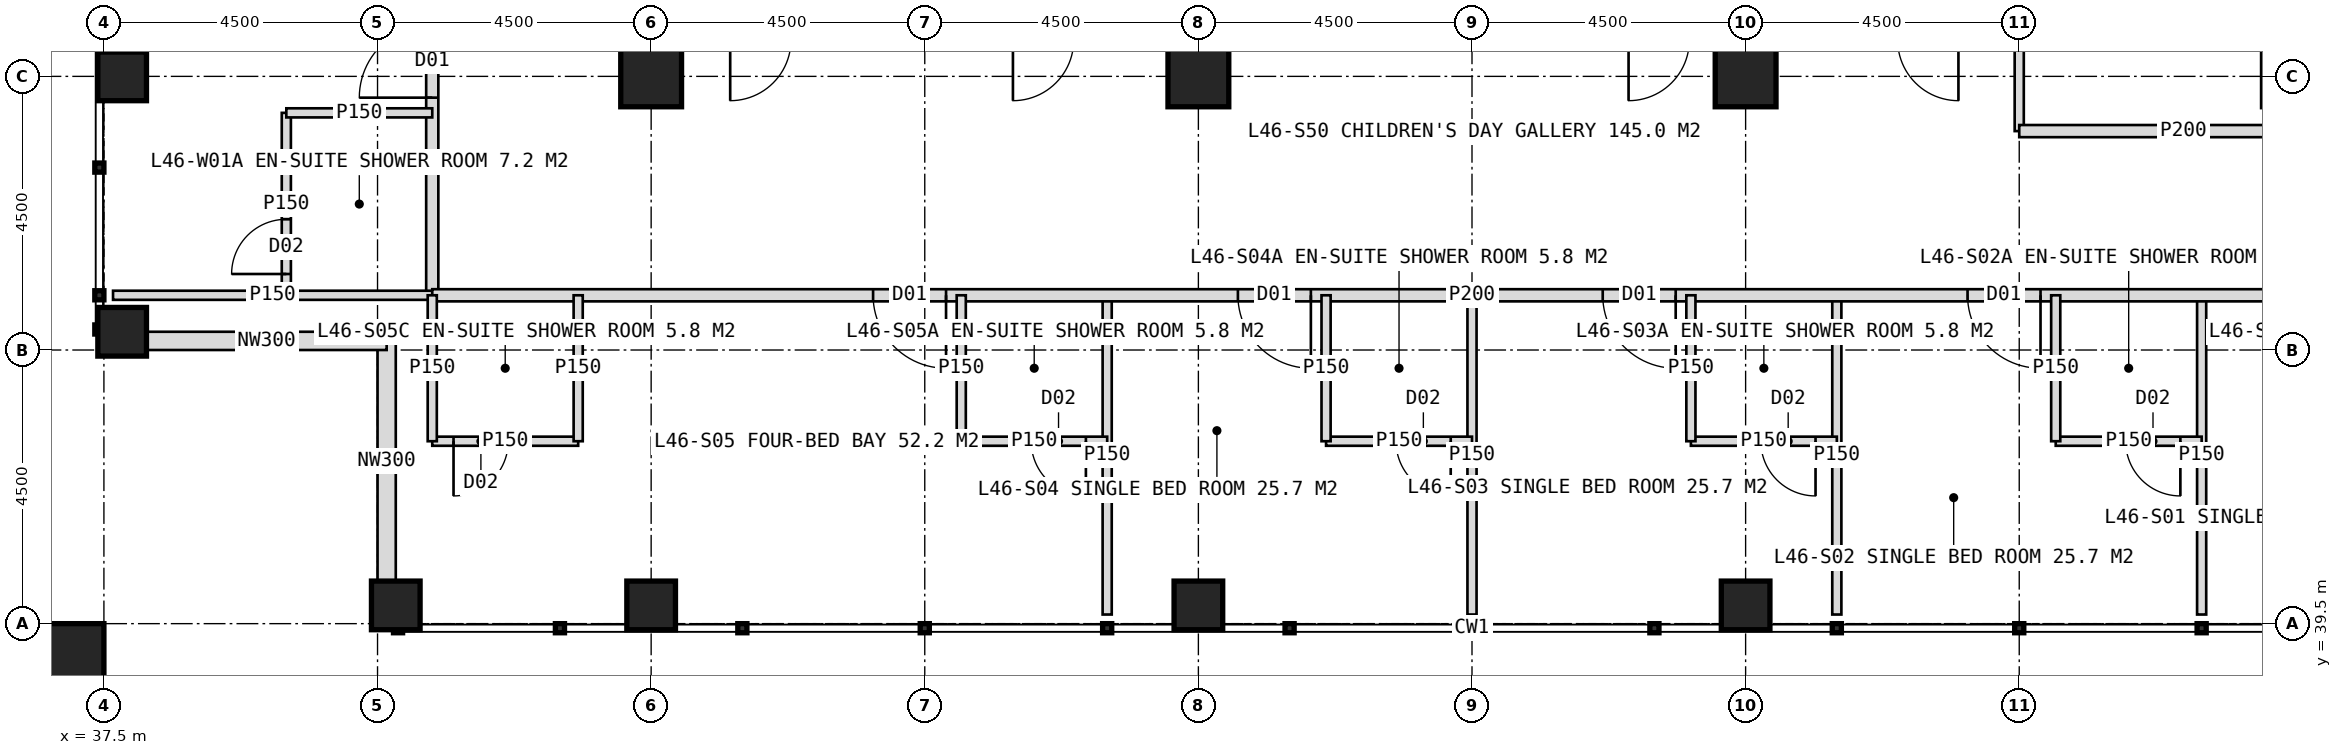
"""IFC4 building model, lengths in metres.
Left out: names, types, materials, properties, quantities, classifications, styles, units other than length and angle.
Written with IfcOpenShell. Run it as: python <this file> out.ifc"""

import sys

from ifc_helpers import new_model, si_unit, direction, frame, frame_2d, origin, origin_2d, place, context, subcontext, project, spatial, rectangle, hollow_rectangle, extrude, element, fill, save


model = new_model("IFC4")
c1 = context("Model", 3, precision=1e-05, world=origin(), true_north=direction((0.0, 1.0)))
c2 = subcontext(c1, "Body", "Model", "MODEL_VIEW")
j1 = project(units=[si_unit("LENGTHUNIT", "METRE"), si_unit("PLANEANGLEUNIT", "RADIAN")], contexts=[c1])
p1 = place(None, origin())
s1 = spatial("IfcSite", under=j1, at=p1, CompositionType="ELEMENT")
p2 = place(p1, origin())
s2 = spatial("IfcBuilding", under=s1, at=p2, CompositionType="ELEMENT")
p3 = place(p2, frame((0.0, 0.0, 193.0)))
s3 = spatial("IfcBuildingStorey", under=s2, at=p3, CompositionType="ELEMENT", Elevation=193.0)
for number, where, z_axis, x_axis in (
    (1, (46.5, 48.5, 0.0), (0.0, 0.0, 1.0), (1.0, 0.0, 0.0)),
    (2, (55.5, 48.5, 0.0), (0.0, 0.0, 1.0), (1.0, 0.0, 0.0)),
    (3, (64.5, 48.5, 0.0), (0.0, 0.0, 1.0), (1.0, 0.0, 0.0)),
):
    element("IfcColumn", number, at=place(p3, frame(where, z_axis=z_axis, x_axis=x_axis)), inside=s3, PredefinedType="COLUMN", context=c2, shape_type="SweptSolid", body=[
        extrude(hollow_rectangle(XDim=1.0, YDim=1.0, WallThickness=0.1, at=origin_2d()), origin(), (0.0, 0.0, 1.0), 4.0),
    ])
for number, where, z_axis, x_axis in (
    (4, (42.3, 39.8, 0.0), (0.0, 0.0, 1.0), (1.0, 0.0, 0.0)),
    (5, (37.8, 44.3, 0.0), (0.0, 0.0, 1.0), (1.0, 0.0, 0.0)),
    (6, (46.5, 39.8, 0.0), (0.0, 0.0, 1.0), (1.0, 0.0, 0.0)),
    (7, (37.8, 48.5, 0.0), (0.0, 0.0, 1.0), (1.0, 0.0, 0.0)),
    (8, (55.5, 39.8, 0.0), (0.0, 0.0, 1.0), (1.0, 0.0, 0.0)),
    (9, (64.5, 39.8, 0.0), (0.0, 0.0, 1.0), (1.0, 0.0, 0.0)),
):
    element("IfcColumn", number, at=place(p3, frame(where, z_axis=z_axis, x_axis=x_axis)), inside=s3, PredefinedType="COLUMN", context=c2, shape_type="SweptSolid", body=[
        extrude(hollow_rectangle(XDim=0.8, YDim=0.8, WallThickness=0.08, at=origin_2d()), origin(), (0.0, 0.0, 1.0), 4.0),
    ])
p4 = place(p3, frame((36.9, 38.9, 0.0), z_axis=(0.0, 0.0, 1.0), x_axis=(1.0, 0.0, 0.0)))
e10 = element("IfcColumn", 10, at=p4, inside=s3, PredefinedType="COLUMN", context=c2, shape_type="SweptSolid", body=[
    extrude(hollow_rectangle(XDim=1.2, YDim=1.2, WallThickness=0.07, at=origin_2d()), origin(), (0.0, 0.0, 1.0), 4.0),
])
for number, where, z_axis, x_axis in (
    (11, (42.15, 40.2, 0.0), (0.0, 0.0, 1.0), (0.0, 1.0, 0.0)),
    (12, (42.15, 44.15, 0.0), (0.0, 0.0, 1.0), (-1.0, 0.0, 0.0)),
):
    element("IfcWall", number, at=place(p3, frame(where, z_axis=z_axis, x_axis=x_axis)), inside=s3, PredefinedType="ELEMENTEDWALL", context=c2, shape_type="SweptSolid", body=[
        extrude(rectangle(XDim=3.95, YDim=0.3, at=frame_2d((1.975, 0.0))), origin(), (0.0, 0.0, 1.0), 2.85),
    ])
p5 = place(p3, frame((42.9, 44.9, 0.0), z_axis=(0.0, 0.0, 1.0), x_axis=(0.0, 1.0, 0.0)))
e13 = element("IfcWall", 13, at=p5, inside=s3, PredefinedType="PARTITIONING", context=c2, shape_type="SweptSolid", body=[
    extrude(rectangle(XDim=34.2, YDim=0.2, at=frame_2d((17.1, 0.0))), origin(), (0.0, 0.0, 1.0), 3.75),
])
p6 = place(p5, frame((3.25, 0.0, 0.0)))
e14 = element("IfcOpeningElement", 14, at=p6, cuts=e13, PredefinedType="OPENING", context=c2, shape_type="SweptSolid", body=[
    extrude(rectangle(XDim=1.2, YDim=2.2, at=frame_2d((0.6, 1.1))), frame((0.0, 0.11, 0.0), z_axis=(0.0, -1.0, 0.0), x_axis=(1.0, 0.0, 0.0)), (0.0, 0.0, 1.0), 0.22),
])
p7 = place(p5, frame((11.35, 0.0, 0.0)))
e15 = element("IfcOpeningElement", 15, at=p7, cuts=e13, PredefinedType="OPENING", context=c2, shape_type="SweptSolid", body=[
    extrude(rectangle(XDim=1.2, YDim=2.2, at=frame_2d((0.6, 1.1))), frame((0.0, 0.11, 0.0), z_axis=(0.0, -1.0, 0.0), x_axis=(1.0, 0.0, 0.0)), (0.0, 0.0, 1.0), 0.22),
])
p8 = place(p5, frame((20.35, 0.0, 0.0)))
e16 = element("IfcOpeningElement", 16, at=p8, cuts=e13, PredefinedType="OPENING", context=c2, shape_type="SweptSolid", body=[
    extrude(rectangle(XDim=1.2, YDim=2.2, at=frame_2d((0.6, 1.1))), frame((0.0, 0.11, 0.0), z_axis=(0.0, -1.0, 0.0), x_axis=(1.0, 0.0, 0.0)), (0.0, 0.0, 1.0), 0.22),
])
p9 = place(p5, frame((29.35, 0.0, 0.0)))
e17 = element("IfcOpeningElement", 17, at=p9, cuts=e13, PredefinedType="OPENING", context=c2, shape_type="SweptSolid", body=[
    extrude(rectangle(XDim=1.2, YDim=2.2, at=frame_2d((0.6, 1.1))), frame((0.0, 0.11, 0.0), z_axis=(0.0, -1.0, 0.0), x_axis=(1.0, 0.0, 0.0)), (0.0, 0.0, 1.0), 0.22),
])
p10 = place(p3, frame((42.9, 44.9, 0.0), z_axis=(0.0, 0.0, 1.0), x_axis=(-1.0, 0.0, 0.0)))
e18 = element("IfcWall", 18, at=p10, inside=s3, PredefinedType="PARTITIONING", context=c2, shape_type="SweptSolid", body=[
    extrude(rectangle(XDim=5.25, YDim=0.15, at=frame_2d((2.625, 0.0))), origin(), (0.0, 0.0, 1.0), 3.75),
])
p11 = place(p3, frame((40.5, 44.9, 0.0), z_axis=(0.0, 0.0, 1.0), x_axis=(0.0, 1.0, 0.0)))
e19 = element("IfcWall", 19, at=p11, inside=s3, PredefinedType="PARTITIONING", context=c2, shape_type="SweptSolid", body=[
    extrude(rectangle(XDim=3.0, YDim=0.15, at=frame_2d((1.5, 0.0))), origin(), (0.0, 0.0, 1.0), 3.75),
])
p12 = place(p11, frame((0.35, 0.0, 0.0)))
e20 = element("IfcOpeningElement", 20, at=p12, cuts=e19, PredefinedType="OPENING", context=c2, shape_type="SweptSolid", body=[
    extrude(rectangle(XDim=0.9, YDim=2.1, at=frame_2d((0.45, 1.05))), frame((0.0, 0.085, 0.0), z_axis=(0.0, -1.0, 0.0), x_axis=(1.0, 0.0, 0.0)), (0.0, 0.0, 1.0), 0.17),
])
p13 = place(p3, frame((42.9, 47.9, 0.0), z_axis=(0.0, 0.0, 1.0), x_axis=(-1.0, 0.0, 0.0)))
e21 = element("IfcWall", 21, at=p13, inside=s3, PredefinedType="PARTITIONING", context=c2, shape_type="SweptSolid", body=[
    extrude(rectangle(XDim=2.4, YDim=0.15, at=frame_2d((1.2, 0.0))), origin(), (0.0, 0.0, 1.0), 3.75),
])
for number, where, z_axis, x_axis in (
    (22, (72.0, 44.9, 0.0), (0.0, 0.0, 1.0), (0.0, -1.0, 0.0)),
    (23, (66.0, 44.9, 0.0), (0.0, 0.0, 1.0), (0.0, -1.0, 0.0)),
):
    element("IfcWall", number, at=place(p3, frame(where, z_axis=z_axis, x_axis=x_axis)), inside=s3, PredefinedType="PARTITIONING", context=c2, shape_type="SweptSolid", body=[
        extrude(rectangle(XDim=5.25, YDim=0.15, at=frame_2d((2.625, 0.0))), origin(), (0.0, 0.0, 1.0), 3.75),
    ])
p14 = place(p3, frame((60.0, 44.9, 0.0), z_axis=(0.0, 0.0, 1.0), x_axis=(0.0, -1.0, 0.0)))
e24 = element("IfcWall", 24, at=p14, inside=s3, PredefinedType="PARTITIONING", context=c2, shape_type="SweptSolid", body=[
    extrude(rectangle(XDim=5.25, YDim=0.15, at=frame_2d((2.625, 0.0))), origin(), (0.0, 0.0, 1.0), 2.95),
])
p15 = place(p3, frame((54.0, 44.9, 0.0), z_axis=(0.0, 0.0, 1.0), x_axis=(0.0, -1.0, 0.0)))
e25 = element("IfcWall", 25, at=p15, inside=s3, PredefinedType="PARTITIONING", context=c2, shape_type="SweptSolid", body=[
    extrude(rectangle(XDim=5.25, YDim=0.15, at=frame_2d((2.625, 0.0))), origin(), (0.0, 0.0, 1.0), 3.75),
])
p16 = place(p3, frame((77.1, 44.9, 0.0), z_axis=(0.0, 0.0, 1.0), x_axis=(-1.0, 0.0, 0.0)))
e26 = element("IfcWall", 26, at=p16, inside=s3, PredefinedType="PARTITIONING", context=c2, shape_type="SweptSolid", body=[
    extrude(rectangle(XDim=34.2, YDim=0.2, at=frame_2d((17.1, 0.0))), origin(), (0.0, 0.0, 1.0), 3.75),
])
p17 = place(p16, frame((2.65, 0.0, 0.0)))
e27 = element("IfcOpeningElement", 27, at=p17, cuts=e26, PredefinedType="OPENING", context=c2, shape_type="SweptSolid", body=[
    extrude(rectangle(XDim=1.2, YDim=2.2, at=frame_2d((0.6, 1.1))), frame((0.0, 0.11, 0.0), z_axis=(0.0, -1.0, 0.0), x_axis=(1.0, 0.0, 0.0)), (0.0, 0.0, 1.0), 0.22),
])
p18 = place(p16, frame((7.75, 0.0, 0.0)))
e28 = element("IfcOpeningElement", 28, at=p18, cuts=e26, PredefinedType="OPENING", context=c2, shape_type="SweptSolid", body=[
    extrude(rectangle(XDim=1.2, YDim=2.2, at=frame_2d((0.6, 1.1))), frame((0.0, 0.11, 0.0), z_axis=(0.0, -1.0, 0.0), x_axis=(1.0, 0.0, 0.0)), (0.0, 0.0, 1.0), 0.22),
])
p19 = place(p16, frame((13.75, 0.0, 0.0)))
e29 = element("IfcOpeningElement", 29, at=p19, cuts=e26, PredefinedType="OPENING", context=c2, shape_type="SweptSolid", body=[
    extrude(rectangle(XDim=1.2, YDim=2.2, at=frame_2d((0.6, 1.1))), frame((0.0, 0.11, 0.0), z_axis=(0.0, -1.0, 0.0), x_axis=(1.0, 0.0, 0.0)), (0.0, 0.0, 1.0), 0.22),
])
p20 = place(p16, frame((19.75, 0.0, 0.0)))
e30 = element("IfcOpeningElement", 30, at=p20, cuts=e26, PredefinedType="OPENING", context=c2, shape_type="SweptSolid", body=[
    extrude(rectangle(XDim=1.2, YDim=2.2, at=frame_2d((0.6, 1.1))), frame((0.0, 0.11, 0.0), z_axis=(0.0, -1.0, 0.0), x_axis=(1.0, 0.0, 0.0)), (0.0, 0.0, 1.0), 0.22),
])
p21 = place(p16, frame((25.75, 0.0, 0.0)))
e31 = element("IfcOpeningElement", 31, at=p21, cuts=e26, PredefinedType="OPENING", context=c2, shape_type="SweptSolid", body=[
    extrude(rectangle(XDim=1.2, YDim=2.2, at=frame_2d((0.6, 1.1))), frame((0.0, 0.11, 0.0), z_axis=(0.0, -1.0, 0.0), x_axis=(1.0, 0.0, 0.0)), (0.0, 0.0, 1.0), 0.22),
])
p22 = place(p3, frame((72.0, 42.5, 0.0), z_axis=(0.0, 0.0, 1.0), x_axis=(-1.0, 0.0, 0.0)))
e32 = element("IfcWall", 32, at=p22, inside=s3, PredefinedType="PARTITIONING", context=c2, shape_type="SweptSolid", body=[
    extrude(rectangle(XDim=2.4, YDim=0.15, at=frame_2d((1.2, 0.0))), origin(), (0.0, 0.0, 1.0), 3.75),
])
p23 = place(p22, frame((0.35, 0.0, 0.0)))
e33 = element("IfcOpeningElement", 33, at=p23, cuts=e32, PredefinedType="OPENING", context=c2, shape_type="SweptSolid", body=[
    extrude(rectangle(XDim=0.9, YDim=2.1, at=frame_2d((0.45, 1.05))), frame((0.0, 0.085, 0.0), z_axis=(0.0, -1.0, 0.0), x_axis=(1.0, 0.0, 0.0)), (0.0, 0.0, 1.0), 0.17),
])
p24 = place(p3, frame((69.6, 44.9, 0.0), z_axis=(0.0, 0.0, 1.0), x_axis=(0.0, -1.0, 0.0)))
e34 = element("IfcWall", 34, at=p24, inside=s3, PredefinedType="PARTITIONING", context=c2, shape_type="SweptSolid", body=[
    extrude(rectangle(XDim=2.4, YDim=0.15, at=frame_2d((1.2, 0.0))), origin(), (0.0, 0.0, 1.0), 3.75),
])
p25 = place(p3, frame((66.0, 42.5, 0.0), z_axis=(0.0, 0.0, 1.0), x_axis=(-1.0, 0.0, 0.0)))
e35 = element("IfcWall", 35, at=p25, inside=s3, PredefinedType="PARTITIONING", context=c2, shape_type="SweptSolid", body=[
    extrude(rectangle(XDim=2.4, YDim=0.15, at=frame_2d((1.2, 0.0))), origin(), (0.0, 0.0, 1.0), 3.75),
])
p26 = place(p25, frame((0.35, 0.0, 0.0)))
e36 = element("IfcOpeningElement", 36, at=p26, cuts=e35, PredefinedType="OPENING", context=c2, shape_type="SweptSolid", body=[
    extrude(rectangle(XDim=0.9, YDim=2.1, at=frame_2d((0.45, 1.05))), frame((0.0, 0.085, 0.0), z_axis=(0.0, -1.0, 0.0), x_axis=(1.0, 0.0, 0.0)), (0.0, 0.0, 1.0), 0.17),
])
p27 = place(p3, frame((63.6, 44.9, 0.0), z_axis=(0.0, 0.0, 1.0), x_axis=(0.0, -1.0, 0.0)))
e37 = element("IfcWall", 37, at=p27, inside=s3, PredefinedType="PARTITIONING", context=c2, shape_type="SweptSolid", body=[
    extrude(rectangle(XDim=2.4, YDim=0.15, at=frame_2d((1.2, 0.0))), origin(), (0.0, 0.0, 1.0), 3.75),
])
p28 = place(p3, frame((60.0, 42.5, 0.0), z_axis=(0.0, 0.0, 1.0), x_axis=(-1.0, 0.0, 0.0)))
e38 = element("IfcWall", 38, at=p28, inside=s3, PredefinedType="PARTITIONING", context=c2, shape_type="SweptSolid", body=[
    extrude(rectangle(XDim=2.4, YDim=0.15, at=frame_2d((1.2, 0.0))), origin(), (0.0, 0.0, 1.0), 3.75),
])
p29 = place(p28, frame((0.35, 0.0, 0.0)))
e39 = element("IfcOpeningElement", 39, at=p29, cuts=e38, PredefinedType="OPENING", context=c2, shape_type="SweptSolid", body=[
    extrude(rectangle(XDim=0.9, YDim=2.1, at=frame_2d((0.45, 1.05))), frame((0.0, 0.085, 0.0), z_axis=(0.0, -1.0, 0.0), x_axis=(1.0, 0.0, 0.0)), (0.0, 0.0, 1.0), 0.17),
])
p30 = place(p3, frame((57.6, 44.9, 0.0), z_axis=(0.0, 0.0, 1.0), x_axis=(0.0, -1.0, 0.0)))
e40 = element("IfcWall", 40, at=p30, inside=s3, PredefinedType="PARTITIONING", context=c2, shape_type="SweptSolid", body=[
    extrude(rectangle(XDim=2.4, YDim=0.15, at=frame_2d((1.2, 0.0))), origin(), (0.0, 0.0, 1.0), 3.75),
])
p31 = place(p3, frame((54.0, 42.5, 0.0), z_axis=(0.0, 0.0, 1.0), x_axis=(-1.0, 0.0, 0.0)))
e41 = element("IfcWall", 41, at=p31, inside=s3, PredefinedType="PARTITIONING", context=c2, shape_type="SweptSolid", body=[
    extrude(rectangle(XDim=2.4, YDim=0.15, at=frame_2d((1.2, 0.0))), origin(), (0.0, 0.0, 1.0), 3.75),
])
p32 = place(p31, frame((0.35, 0.0, 0.0)))
e42 = element("IfcOpeningElement", 42, at=p32, cuts=e41, PredefinedType="OPENING", context=c2, shape_type="SweptSolid", body=[
    extrude(rectangle(XDim=0.9, YDim=2.1, at=frame_2d((0.45, 1.05))), frame((0.0, 0.085, 0.0), z_axis=(0.0, -1.0, 0.0), x_axis=(1.0, 0.0, 0.0)), (0.0, 0.0, 1.0), 0.17),
])
p33 = place(p3, frame((51.6, 44.9, 0.0), z_axis=(0.0, 0.0, 1.0), x_axis=(0.0, -1.0, 0.0)))
e43 = element("IfcWall", 43, at=p33, inside=s3, PredefinedType="PARTITIONING", context=c2, shape_type="SweptSolid", body=[
    extrude(rectangle(XDim=2.4, YDim=0.15, at=frame_2d((1.2, 0.0))), origin(), (0.0, 0.0, 1.0), 3.75),
])
p34 = place(p3, frame((45.3, 42.5, 0.0), z_axis=(0.0, 0.0, 1.0), x_axis=(-1.0, 0.0, 0.0)))
e44 = element("IfcWall", 44, at=p34, inside=s3, PredefinedType="PARTITIONING", context=c2, shape_type="SweptSolid", body=[
    extrude(rectangle(XDim=2.4, YDim=0.15, at=frame_2d((1.2, 0.0))), origin(), (0.0, 0.0, 1.0), 3.75),
])
p35 = place(p34, frame((1.15, 0.0, 0.0)))
e45 = element("IfcOpeningElement", 45, at=p35, cuts=e44, PredefinedType="OPENING", context=c2, shape_type="SweptSolid", body=[
    extrude(rectangle(XDim=0.9, YDim=2.1, at=frame_2d((0.45, 1.05))), frame((0.0, 0.085, 0.0), z_axis=(0.0, -1.0, 0.0), x_axis=(1.0, 0.0, 0.0)), (0.0, 0.0, 1.0), 0.17),
])
for number, where, z_axis, x_axis in (
    (46, (45.3, 44.9, 0.0), (0.0, 0.0, 1.0), (0.0, -1.0, 0.0)),
    (47, (42.9, 44.9, 0.0), (0.0, 0.0, 1.0), (0.0, -1.0, 0.0)),
):
    element("IfcWall", number, at=place(p3, frame(where, z_axis=z_axis, x_axis=x_axis)), inside=s3, PredefinedType="PARTITIONING", context=c2, shape_type="SweptSolid", body=[
        extrude(rectangle(XDim=2.4, YDim=0.15, at=frame_2d((1.2, 0.0))), origin(), (0.0, 0.0, 1.0), 3.75),
    ])
p36 = place(p3, frame((69.0, 53.0, 0.0), z_axis=(0.0, 0.0, 1.0), x_axis=(0.0, -1.0, 0.0)))
e48 = element("IfcWall", 48, at=p36, inside=s3, PredefinedType="PARTITIONING", context=c2, shape_type="SweptSolid", body=[
    extrude(rectangle(XDim=5.4, YDim=0.15, at=frame_2d((2.7, 0.0))), origin(), (0.0, 0.0, 1.0), 3.75),
])
p37 = place(p3, frame((74.4, 47.6, 0.0), z_axis=(0.0, 0.0, 1.0), x_axis=(-1.0, 0.0, 0.0)))
e49 = element("IfcWall", 49, at=p37, inside=s3, PredefinedType="PARTITIONING", context=c2, shape_type="SweptSolid", body=[
    extrude(rectangle(XDim=5.4, YDim=0.2, at=frame_2d((2.7, 0.0))), origin(), (0.0, 0.0, 1.0), 3.75),
])
p38 = place(p6, origin())
e50 = element("IfcDoor", 50, at=p38, inside=s3, OperationType="SINGLE_SWING_LEFT", PredefinedType="DOOR", context=c2, shape_type="SweptSolid", body=[
    extrude(rectangle(XDim=1.2, YDim=2.2, at=frame_2d((0.6, 1.1))), frame((0.0, 0.025, 0.0), z_axis=(0.0, -1.0, 0.0), x_axis=(1.0, 0.0, 0.0)), (0.0, 0.0, 1.0), 0.05),
])
fill(e14, e50)
p39 = place(p12, origin())
e51 = element("IfcDoor", 51, at=p39, inside=s3, OperationType="SINGLE_SWING_LEFT", PredefinedType="DOOR", context=c2, shape_type="SweptSolid", body=[
    extrude(rectangle(XDim=0.9, YDim=2.1, at=frame_2d((0.45, 1.05))), frame((0.0, 0.025, 0.0), z_axis=(0.0, -1.0, 0.0), x_axis=(1.0, 0.0, 0.0)), (0.0, 0.0, 1.0), 0.05),
])
fill(e20, e51)
p40 = place(p18, origin())
e52 = element("IfcDoor", 52, at=p40, inside=s3, OperationType="SINGLE_SWING_LEFT", PredefinedType="DOOR", context=c2, shape_type="SweptSolid", body=[
    extrude(rectangle(XDim=1.2, YDim=2.2, at=frame_2d((0.6, 1.1))), frame((0.0, 0.025, 0.0), z_axis=(0.0, -1.0, 0.0), x_axis=(1.0, 0.0, 0.0)), (0.0, 0.0, 1.0), 0.05),
])
fill(e28, e52)
p41 = place(p23, origin())
e53 = element("IfcDoor", 53, at=p41, inside=s3, OperationType="SINGLE_SWING_LEFT", PredefinedType="DOOR", context=c2, shape_type="SweptSolid", body=[
    extrude(rectangle(XDim=0.9, YDim=2.1, at=frame_2d((0.45, 1.05))), frame((0.0, 0.025, 0.0), z_axis=(0.0, -1.0, 0.0), x_axis=(1.0, 0.0, 0.0)), (0.0, 0.0, 1.0), 0.05),
])
fill(e33, e53)
p42 = place(p19, origin())
e54 = element("IfcDoor", 54, at=p42, inside=s3, OperationType="SINGLE_SWING_LEFT", PredefinedType="DOOR", context=c2, shape_type="SweptSolid", body=[
    extrude(rectangle(XDim=1.2, YDim=2.2, at=frame_2d((0.6, 1.1))), frame((0.0, 0.025, 0.0), z_axis=(0.0, -1.0, 0.0), x_axis=(1.0, 0.0, 0.0)), (0.0, 0.0, 1.0), 0.05),
])
fill(e29, e54)
p43 = place(p26, origin())
e55 = element("IfcDoor", 55, at=p43, inside=s3, OperationType="SINGLE_SWING_LEFT", PredefinedType="DOOR", context=c2, shape_type="SweptSolid", body=[
    extrude(rectangle(XDim=0.9, YDim=2.1, at=frame_2d((0.45, 1.05))), frame((0.0, 0.025, 0.0), z_axis=(0.0, -1.0, 0.0), x_axis=(1.0, 0.0, 0.0)), (0.0, 0.0, 1.0), 0.05),
])
fill(e36, e55)
p44 = place(p20, origin())
e56 = element("IfcDoor", 56, at=p44, inside=s3, OperationType="SINGLE_SWING_LEFT", PredefinedType="DOOR", context=c2, shape_type="SweptSolid", body=[
    extrude(rectangle(XDim=1.2, YDim=2.2, at=frame_2d((0.6, 1.1))), frame((0.0, 0.025, 0.0), z_axis=(0.0, -1.0, 0.0), x_axis=(1.0, 0.0, 0.0)), (0.0, 0.0, 1.0), 0.05),
])
fill(e30, e56)
p45 = place(p29, origin())
e57 = element("IfcDoor", 57, at=p45, inside=s3, OperationType="SINGLE_SWING_LEFT", PredefinedType="DOOR", context=c2, shape_type="SweptSolid", body=[
    extrude(rectangle(XDim=0.9, YDim=2.1, at=frame_2d((0.45, 1.05))), frame((0.0, 0.025, 0.0), z_axis=(0.0, -1.0, 0.0), x_axis=(1.0, 0.0, 0.0)), (0.0, 0.0, 1.0), 0.05),
])
fill(e39, e57)
p46 = place(p21, origin())
e58 = element("IfcDoor", 58, at=p46, inside=s3, OperationType="SINGLE_SWING_LEFT", PredefinedType="DOOR", context=c2, shape_type="SweptSolid", body=[
    extrude(rectangle(XDim=1.2, YDim=2.2, at=frame_2d((0.6, 1.1))), frame((0.0, 0.025, 0.0), z_axis=(0.0, -1.0, 0.0), x_axis=(1.0, 0.0, 0.0)), (0.0, 0.0, 1.0), 0.05),
])
fill(e31, e58)
p47 = place(p32, origin())
e59 = element("IfcDoor", 59, at=p47, inside=s3, OperationType="SINGLE_SWING_LEFT", PredefinedType="DOOR", context=c2, shape_type="SweptSolid", body=[
    extrude(rectangle(XDim=0.9, YDim=2.1, at=frame_2d((0.45, 1.05))), frame((0.0, 0.025, 0.0), z_axis=(0.0, -1.0, 0.0), x_axis=(1.0, 0.0, 0.0)), (0.0, 0.0, 1.0), 0.05),
])
fill(e42, e59)
p48 = place(p35, origin())
e60 = element("IfcDoor", 60, at=p48, inside=s3, OperationType="SINGLE_SWING_RIGHT", PredefinedType="DOOR", context=c2, shape_type="SweptSolid", body=[
    extrude(rectangle(XDim=0.9, YDim=2.1, at=frame_2d((0.45, 1.05))), frame((0.0, 0.025, 0.0), z_axis=(0.0, -1.0, 0.0), x_axis=(1.0, 0.0, 0.0)), (0.0, 0.0, 1.0), 0.05),
])
fill(e45, e60)
save(model, sys.argv[1])
